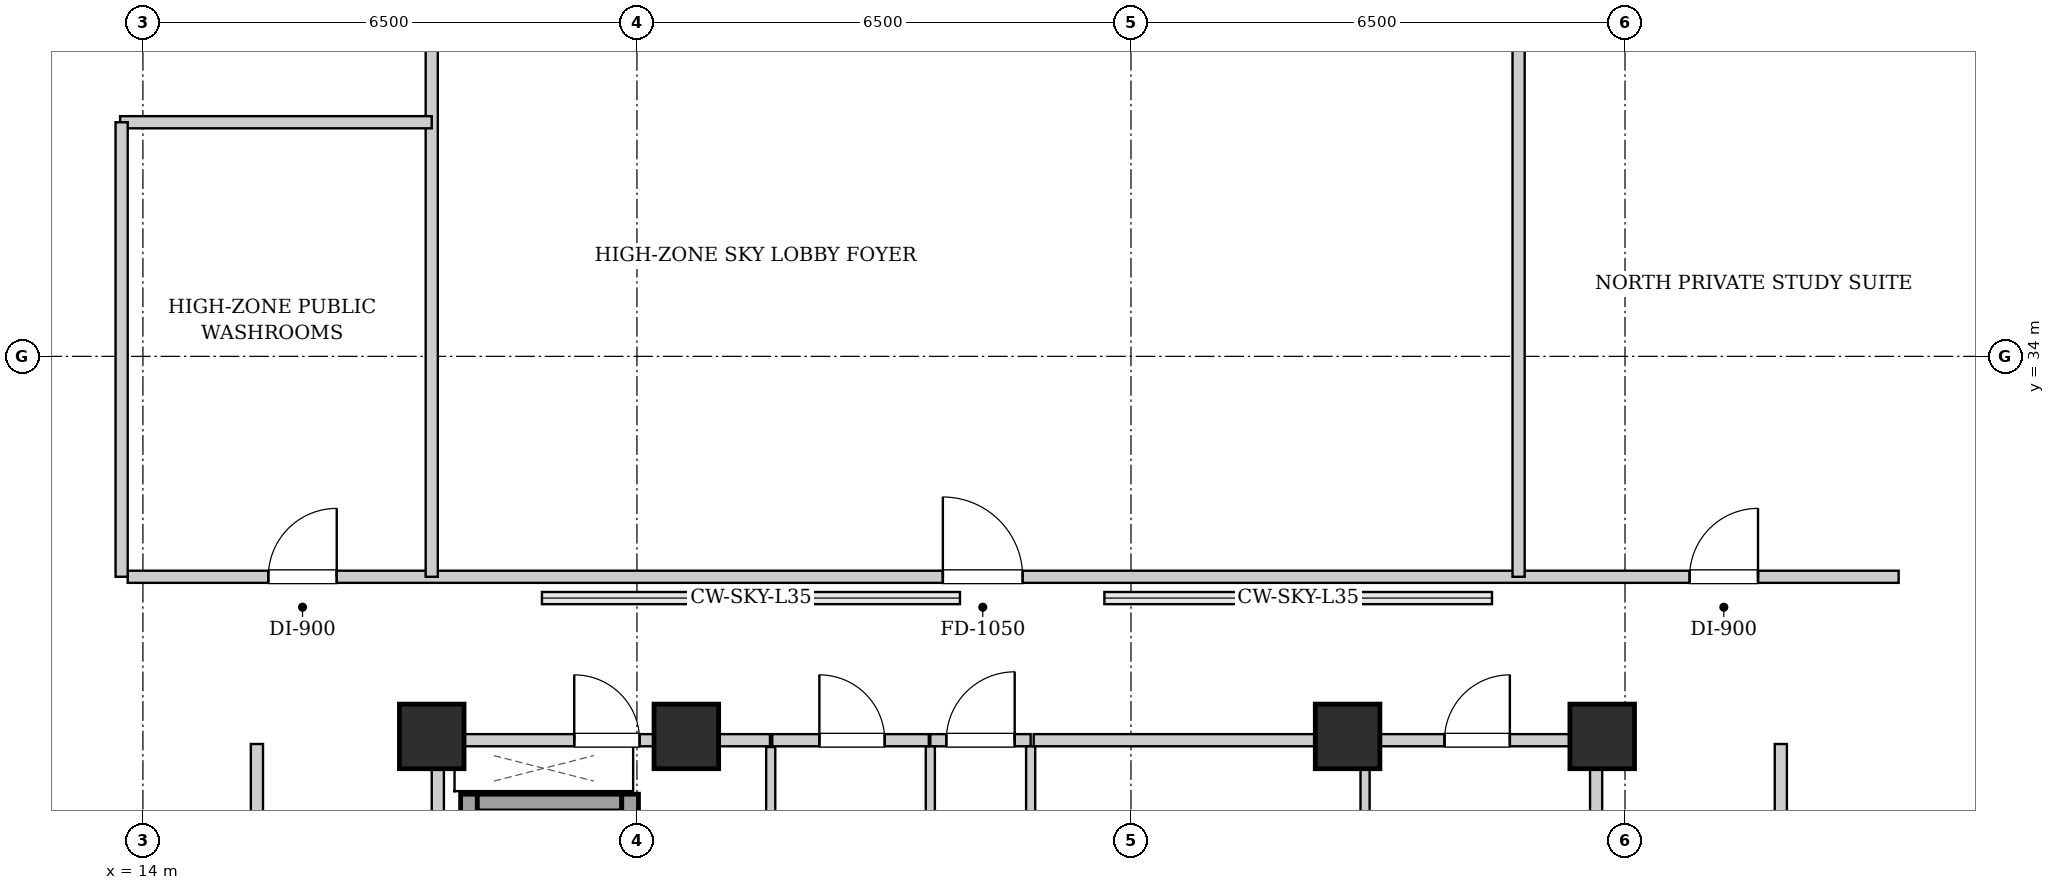
"""IFC4 building model, lengths in metres.
Left out: names, types, materials, properties, quantities, classifications, styles, units other than length and angle.
Written with IfcOpenShell. Run it as: python <this file> out.ifc"""

import sys

from ifc_helpers import new_model, si_unit, direction, frame, frame_2d, origin, origin_2d, place, context, subcontext, project, spatial, rectangle, extrude, element, fill, save


model = new_model("IFC4")
c1 = context("Model", 3, precision=1e-05, world=origin(), true_north=direction((0.0, 1.0)))
c2 = subcontext(c1, "Body", "Model", "MODEL_VIEW")
j1 = project(units=[si_unit("LENGTHUNIT", "METRE"), si_unit("PLANEANGLEUNIT", "RADIAN")], contexts=[c1])
p1 = place(None, origin())
s1 = spatial("IfcSite", under=j1, at=p1, CompositionType="ELEMENT")
p2 = place(p1, origin())
s2 = spatial("IfcBuilding", under=s1, at=p2, CompositionType="ELEMENT")
p3 = place(p2, frame((0.0, 0.0, 174.4)))
s3 = spatial("IfcBuildingStorey", under=s2, at=p3, CompositionType="ELEMENT", Elevation=174.4)
for number, where, z_axis, x_axis in (
    (1, (17.8, 29.0, 0.0), (0.0, 0.0, 1.0), (1.0, 0.0, 0.0)),
    (2, (21.15, 29.0, 0.0), (0.0, 0.0, 1.0), (1.0, 0.0, 0.0)),
    (3, (29.85, 29.0, 0.0), (0.0, 0.0, 1.0), (1.0, 0.0, 0.0)),
    (4, (33.2, 29.0, 0.0), (0.0, 0.0, 1.0), (1.0, 0.0, 0.0)),
):
    element("IfcColumn", number, at=place(p3, frame(where, z_axis=z_axis, x_axis=x_axis)), inside=s3, PredefinedType="COLUMN", context=c2, shape_type="SweptSolid", body=[
        extrude(rectangle(XDim=0.85, YDim=0.85, at=origin_2d()), origin(), (0.0, 0.0, 1.0), 3.3),
    ])
p4 = place(p3, frame((18.29, 24.1, 0.0), z_axis=(0.0, 0.0, 1.0), x_axis=(0.0, 1.0, 0.0)))
e5 = element("IfcWall", 5, at=p4, inside=s3, PredefinedType="SHEAR", context=c2, shape_type="SweptSolid", body=[
    extrude(rectangle(XDim=4.14, YDim=0.22, at=frame_2d((2.07, 0.0))), origin(), (0.0, 0.0, 1.0), 3.04),
])
p5 = place(p3, frame((18.4, 28.13, 0.0), z_axis=(0.0, 0.0, 1.0), x_axis=(1.0, 0.0, 0.0)))
e6 = element("IfcWall", 6, at=p5, inside=s3, PredefinedType="SHEAR", context=c2, shape_type="SweptSolid", body=[
    extrude(rectangle(XDim=1.9, YDim=0.22, at=frame_2d((0.95, 0.0))), origin(), (0.0, 0.0, 1.0), 3.04),
])
p6 = place(p3, frame((20.41, 26.06, 0.0), z_axis=(0.0, 0.0, 1.0), x_axis=(0.0, 1.0, 0.0)))
e7 = element("IfcWall", 7, at=p6, inside=s3, PredefinedType="SHEAR", context=c2, shape_type="SweptSolid", body=[
    extrude(rectangle(XDim=2.18, YDim=0.22, at=frame_2d((1.09, 0.0))), origin(), (0.0, 0.0, 1.0), 3.04),
])
p7 = place(p6, frame((0.54, 0.0, 0.0)))
e8 = element("IfcOpeningElement", 8, at=p7, cuts=e7, PredefinedType="OPENING", context=c2, shape_type="SweptSolid", body=[
    extrude(rectangle(XDim=1.1, YDim=2.15, at=frame_2d((0.55, 1.075))), frame((0.0, 0.12, 0.0), z_axis=(0.0, -1.0, 0.0), x_axis=(1.0, 0.0, 0.0)), (0.0, 0.0, 1.0), 0.24),
])
for number, where, z_axis, x_axis in (
    (9, (17.88, 24.12, 0.0), (0.0, 0.0, 1.0), (0.0, 1.0, 0.0)),
    (10, (33.12, 24.12, 0.0), (0.0, 0.0, 1.0), (0.0, 1.0, 0.0)),
):
    element("IfcWall", number, at=place(p3, frame(where, z_axis=z_axis, x_axis=x_axis)), inside=s3, PredefinedType="PARTITIONING", context=c2, shape_type="SweptSolid", body=[
        extrude(rectangle(XDim=4.76, YDim=0.16, at=frame_2d((2.38, 0.0))), origin(), (0.0, 0.0, 1.0), 3.04),
    ])
p8 = place(p3, frame((24.36, 28.95, 0.0), z_axis=(0.0, 0.0, 1.0), x_axis=(1.0, 0.0, 0.0)))
e11 = element("IfcWall", 11, at=p8, inside=s3, PredefinedType="PARTITIONING", context=c2, shape_type="SweptSolid", body=[
    extrude(rectangle(XDim=1.32, YDim=0.16, at=frame_2d((0.66, 0.0))), origin(), (0.0, 0.0, 1.0), 2.556),
])
p9 = place(p8, frame((0.21, 0.0, 0.0)))
e12 = element("IfcOpeningElement", 12, at=p9, cuts=e11, PredefinedType="OPENING", context=c2, shape_type="SweptSolid", body=[
    extrude(rectangle(XDim=0.9, YDim=2.05, at=frame_2d((0.45, 1.025))), frame((0.0, 0.09, 0.0), z_axis=(0.0, -1.0, 0.0), x_axis=(1.0, 0.0, 0.0)), (0.0, 0.0, 1.0), 0.18),
])
p10 = place(p3, frame((17.96, 28.95, 0.0), z_axis=(0.0, 0.0, 1.0), x_axis=(1.0, 0.0, 0.0)))
e13 = element("IfcWall", 13, at=p10, inside=s3, PredefinedType="PARTITIONING", context=c2, shape_type="SweptSolid", body=[
    extrude(rectangle(XDim=4.29, YDim=0.16, at=frame_2d((2.145, 0.0))), origin(), (0.0, 0.0, 1.0), 2.556),
])
p11 = place(p10, frame((1.715, 0.0, 0.0)))
e14 = element("IfcOpeningElement", 14, at=p11, cuts=e13, PredefinedType="OPENING", context=c2, shape_type="SweptSolid", body=[
    extrude(rectangle(XDim=0.86, YDim=2.05, at=frame_2d((0.43, 1.025))), frame((0.0, 0.09, 0.0), z_axis=(0.0, -1.0, 0.0), x_axis=(1.0, 0.0, 0.0)), (0.0, 0.0, 1.0), 0.18),
])
for number, where, z_axis, x_axis in (
    (15, (24.36, 25.0, 0.0), (0.0, 0.0, 1.0), (0.0, 1.0, 0.0)),
    (16, (25.68, 25.0, 0.0), (0.0, 0.0, 1.0), (0.0, 1.0, 0.0)),
):
    element("IfcWall", number, at=place(p3, frame(where, z_axis=z_axis, x_axis=x_axis)), inside=s3, PredefinedType="PARTITIONING", context=c2, shape_type="SweptSolid", body=[
        extrude(rectangle(XDim=3.87, YDim=0.12, at=frame_2d((1.935, 0.0))), origin(), (0.0, 0.0, 1.0), 3.04),
    ])
p12 = place(p3, frame((30.08, 26.18, 0.0), z_axis=(0.0, 0.0, 1.0), x_axis=(0.0, 1.0, 0.0)))
e17 = element("IfcWall", 17, at=p12, inside=s3, PredefinedType="PARTITIONING", context=c2, shape_type="SweptSolid", body=[
    extrude(rectangle(XDim=2.68, YDim=0.12, at=frame_2d((1.34, 0.0))), origin(), (0.0, 0.0, 1.0), 3.04),
])
p13 = place(p3, frame((30.08, 28.95, 0.0), z_axis=(0.0, 0.0, 1.0), x_axis=(1.0, 0.0, 0.0)))
e18 = element("IfcWall", 18, at=p13, inside=s3, PredefinedType="PARTITIONING", context=c2, shape_type="SweptSolid", body=[
    extrude(rectangle(XDim=2.96, YDim=0.16, at=frame_2d((1.48, 0.0))), origin(), (0.0, 0.0, 1.0), 3.04),
])
p14 = place(p13, frame((1.045, 0.0, 0.0)))
e19 = element("IfcOpeningElement", 19, at=p14, cuts=e18, PredefinedType="OPENING", context=c2, shape_type="SweptSolid", body=[
    extrude(rectangle(XDim=0.86, YDim=2.05, at=frame_2d((0.43, 1.025))), frame((0.0, 0.09, 0.0), z_axis=(0.0, -1.0, 0.0), x_axis=(1.0, 0.0, 0.0)), (0.0, 0.0, 1.0), 0.18),
])
p15 = place(p3, frame((22.26, 25.0, 0.0), z_axis=(0.0, 0.0, 1.0), x_axis=(0.0, 1.0, 0.0)))
e20 = element("IfcWall", 20, at=p15, inside=s3, PredefinedType="PARTITIONING", context=c2, shape_type="SweptSolid", body=[
    extrude(rectangle(XDim=3.86, YDim=0.12, at=frame_2d((1.93, 0.0))), origin(), (0.0, 0.0, 1.0), 3.04),
])
p16 = place(p3, frame((22.28, 28.95, 0.0), z_axis=(0.0, 0.0, 1.0), x_axis=(1.0, 0.0, 0.0)))
e21 = element("IfcWall", 21, at=p16, inside=s3, PredefinedType="PARTITIONING", context=c2, shape_type="SweptSolid", body=[
    extrude(rectangle(XDim=2.06, YDim=0.16, at=frame_2d((1.03, 0.0))), origin(), (0.0, 0.0, 1.0), 2.556),
])
p17 = place(p16, frame((0.62, 0.0, 0.0)))
e22 = element("IfcOpeningElement", 22, at=p17, cuts=e21, PredefinedType="OPENING", context=c2, shape_type="SweptSolid", body=[
    extrude(rectangle(XDim=0.86, YDim=2.05, at=frame_2d((0.43, 1.025))), frame((0.0, 0.09, 0.0), z_axis=(0.0, -1.0, 0.0), x_axis=(1.0, 0.0, 0.0)), (0.0, 0.0, 1.0), 0.18),
])
p18 = place(p3, frame((25.72, 28.95, 0.0), z_axis=(0.0, 0.0, 1.0), x_axis=(1.0, 0.0, 0.0)))
e23 = element("IfcWall", 23, at=p18, inside=s3, PredefinedType="PARTITIONING", context=c2, shape_type="SweptSolid", body=[
    extrude(rectangle(XDim=4.32, YDim=0.16, at=frame_2d((2.16, 0.0))), origin(), (0.0, 0.0, 1.0), 2.556),
])
p19 = place(p3, frame((13.8, 31.1, 0.0), z_axis=(0.0, 0.0, 1.0), x_axis=(1.0, 0.0, 0.0)))
e24 = element("IfcWall", 24, at=p19, inside=s3, PredefinedType="PARTITIONING", context=c2, shape_type="SweptSolid", body=[
    extrude(rectangle(XDim=23.3, YDim=0.16, at=frame_2d((11.65, 0.0))), origin(), (0.0, 0.0, 1.0), 3.04),
])
p20 = place(p19, frame((1.85, 0.0, 0.0)))
e25 = element("IfcOpeningElement", 25, at=p20, cuts=e24, PredefinedType="OPENING", context=c2, shape_type="SweptSolid", body=[
    extrude(rectangle(XDim=0.9, YDim=2.05, at=frame_2d((0.45, 1.025))), frame((0.0, 0.09, 0.0), z_axis=(0.0, -1.0, 0.0), x_axis=(1.0, 0.0, 0.0)), (0.0, 0.0, 1.0), 0.18),
])
p21 = place(p19, frame((10.725, 0.0, 0.0)))
e26 = element("IfcOpeningElement", 26, at=p21, cuts=e24, PredefinedType="OPENING", context=c2, shape_type="SweptSolid", body=[
    extrude(rectangle(XDim=1.05, YDim=2.05, at=frame_2d((0.525, 1.025))), frame((0.0, 0.09, 0.0), z_axis=(0.0, -1.0, 0.0), x_axis=(1.0, 0.0, 0.0)), (0.0, 0.0, 1.0), 0.18),
])
p22 = place(p19, frame((20.55, 0.0, 0.0)))
e27 = element("IfcOpeningElement", 27, at=p22, cuts=e24, PredefinedType="OPENING", context=c2, shape_type="SweptSolid", body=[
    extrude(rectangle(XDim=0.9, YDim=2.05, at=frame_2d((0.45, 1.025))), frame((0.0, 0.09, 0.0), z_axis=(0.0, -1.0, 0.0), x_axis=(1.0, 0.0, 0.0)), (0.0, 0.0, 1.0), 0.18),
])
p23 = place(p3, frame((17.8, 31.1, 0.0), z_axis=(0.0, 0.0, 1.0), x_axis=(0.0, 1.0, 0.0)))
e28 = element("IfcWall", 28, at=p23, inside=s3, PredefinedType="PARTITIONING", context=c2, shape_type="SweptSolid", body=[
    extrude(rectangle(XDim=8.8, YDim=0.16, at=frame_2d((4.4, 0.0))), origin(), (0.0, 0.0, 1.0), 2.556),
])
p24 = place(p3, frame((13.7, 37.08, 0.0), z_axis=(0.0, 0.0, 1.0), x_axis=(1.0, 0.0, 0.0)))
e29 = element("IfcWall", 29, at=p24, inside=s3, PredefinedType="PARTITIONING", context=c2, shape_type="SweptSolid", body=[
    extrude(rectangle(XDim=4.1, YDim=0.16, at=frame_2d((2.05, 0.0))), origin(), (0.0, 0.0, 1.0), 3.04),
])
p25 = place(p3, frame((13.72, 31.1, 0.0), z_axis=(0.0, 0.0, 1.0), x_axis=(0.0, 1.0, 0.0)))
e30 = element("IfcWall", 30, at=p25, inside=s3, PredefinedType="PARTITIONING", context=c2, shape_type="SweptSolid", body=[
    extrude(rectangle(XDim=5.98, YDim=0.16, at=frame_2d((2.99, 0.0))), origin(), (0.0, 0.0, 1.0), 3.04),
])
p26 = place(p3, frame((32.1, 31.1, 0.0), z_axis=(0.0, 0.0, 1.0), x_axis=(0.0, 1.0, 0.0)))
e31 = element("IfcWall", 31, at=p26, inside=s3, PredefinedType="PARTITIONING", context=c2, shape_type="SweptSolid", body=[
    extrude(rectangle(XDim=8.82, YDim=0.16, at=frame_2d((4.41, 0.0))), origin(), (0.0, 0.0, 1.0), 3.04),
])
p27 = place(p3, frame((15.5, 15.1, 0.0), z_axis=(0.0, 0.0, 1.0), x_axis=(0.0, 1.0, 0.0)))
e32 = element("IfcWall", 32, at=p27, inside=s3, PredefinedType="PARTITIONING", context=c2, shape_type="SweptSolid", body=[
    extrude(rectangle(XDim=13.8, YDim=0.16, at=frame_2d((6.9, 0.0))), origin(), (0.0, 0.0, 1.0), 3.04),
])
p28 = place(p27, frame((3.65, 0.0, 0.0)))
e33 = element("IfcOpeningElement", 33, at=p28, cuts=e32, PredefinedType="OPENING", context=c2, shape_type="SweptSolid", body=[
    extrude(rectangle(XDim=0.9, YDim=2.05, at=frame_2d((0.45, 1.025))), frame((0.0, 0.09, 0.0), z_axis=(0.0, -1.0, 0.0), x_axis=(1.0, 0.0, 0.0)), (0.0, 0.0, 1.0), 0.18),
])
p29 = place(p27, frame((10.05, 0.0, 0.0)))
e34 = element("IfcOpeningElement", 34, at=p29, cuts=e32, PredefinedType="OPENING", context=c2, shape_type="SweptSolid", body=[
    extrude(rectangle(XDim=0.9, YDim=2.05, at=frame_2d((0.45, 1.025))), frame((0.0, 0.09, 0.0), z_axis=(0.0, -1.0, 0.0), x_axis=(1.0, 0.0, 0.0)), (0.0, 0.0, 1.0), 0.18),
])
p30 = place(p3, frame((35.55, 15.1, 0.0), z_axis=(0.0, 0.0, 1.0), x_axis=(0.0, 1.0, 0.0)))
e35 = element("IfcWall", 35, at=p30, inside=s3, PredefinedType="PARTITIONING", context=c2, shape_type="SweptSolid", body=[
    extrude(rectangle(XDim=13.8, YDim=0.16, at=frame_2d((6.9, 0.0))), origin(), (0.0, 0.0, 1.0), 3.04),
])
p31 = place(p30, frame((6.475, 0.0, 0.0)))
e36 = element("IfcOpeningElement", 36, at=p31, cuts=e35, PredefinedType="OPENING", context=c2, shape_type="SweptSolid", body=[
    extrude(rectangle(XDim=1.05, YDim=2.05, at=frame_2d((0.525, 1.025))), frame((0.0, 0.09, 0.0), z_axis=(0.0, -1.0, 0.0), x_axis=(1.0, 0.0, 0.0)), (0.0, 0.0, 1.0), 0.18),
])
p32 = place(p9, origin())
e37 = element("IfcDoor", 37, at=p32, inside=s3, OperationType="SINGLE_SWING_RIGHT", PredefinedType="DOOR", context=c2, shape_type="SweptSolid", body=[
    extrude(rectangle(XDim=0.9, YDim=2.05, at=frame_2d((0.45, 1.025))), frame((0.0, 0.025, 0.0), z_axis=(0.0, -1.0, 0.0), x_axis=(1.0, 0.0, 0.0)), (0.0, 0.0, 1.0), 0.05),
])
fill(e12, e37)
p33 = place(p11, origin())
e38 = element("IfcDoor", 38, at=p33, inside=s3, OperationType="SINGLE_SWING_LEFT", PredefinedType="DOOR", context=c2, shape_type="SweptSolid", body=[
    extrude(rectangle(XDim=0.86, YDim=2.05, at=frame_2d((0.43, 1.025))), frame((0.0, 0.025, 0.0), z_axis=(0.0, -1.0, 0.0), x_axis=(1.0, 0.0, 0.0)), (0.0, 0.0, 1.0), 0.05),
])
fill(e14, e38)
p34 = place(p14, origin())
e39 = element("IfcDoor", 39, at=p34, inside=s3, OperationType="SINGLE_SWING_RIGHT", PredefinedType="DOOR", context=c2, shape_type="SweptSolid", body=[
    extrude(rectangle(XDim=0.86, YDim=2.05, at=frame_2d((0.43, 1.025))), frame((0.0, 0.025, 0.0), z_axis=(0.0, -1.0, 0.0), x_axis=(1.0, 0.0, 0.0)), (0.0, 0.0, 1.0), 0.05),
])
fill(e19, e39)
p35 = place(p17, origin())
e40 = element("IfcDoor", 40, at=p35, inside=s3, OperationType="SINGLE_SWING_LEFT", PredefinedType="DOOR", context=c2, shape_type="SweptSolid", body=[
    extrude(rectangle(XDim=0.86, YDim=2.05, at=frame_2d((0.43, 1.025))), frame((0.0, 0.025, 0.0), z_axis=(0.0, -1.0, 0.0), x_axis=(1.0, 0.0, 0.0)), (0.0, 0.0, 1.0), 0.05),
])
fill(e22, e40)
p36 = place(p20, origin())
e41 = element("IfcDoor", 41, at=p36, inside=s3, OperationType="SINGLE_SWING_RIGHT", PredefinedType="DOOR", context=c2, shape_type="SweptSolid", body=[
    extrude(rectangle(XDim=0.9, YDim=2.05, at=frame_2d((0.45, 1.025))), frame((0.0, 0.025, 0.0), z_axis=(0.0, -1.0, 0.0), x_axis=(1.0, 0.0, 0.0)), (0.0, 0.0, 1.0), 0.05),
])
fill(e25, e41)
p37 = place(p21, origin())
e42 = element("IfcDoor", 42, at=p37, inside=s3, OperationType="SINGLE_SWING_LEFT", PredefinedType="DOOR", context=c2, shape_type="SweptSolid", body=[
    extrude(rectangle(XDim=1.05, YDim=2.05, at=frame_2d((0.525, 1.025))), frame((0.0, 0.025, 0.0), z_axis=(0.0, -1.0, 0.0), x_axis=(1.0, 0.0, 0.0)), (0.0, 0.0, 1.0), 0.05),
])
fill(e26, e42)
p38 = place(p22, origin())
e43 = element("IfcDoor", 43, at=p38, inside=s3, OperationType="SINGLE_SWING_RIGHT", PredefinedType="DOOR", context=c2, shape_type="SweptSolid", body=[
    extrude(rectangle(XDim=0.9, YDim=2.05, at=frame_2d((0.45, 1.025))), frame((0.0, 0.025, 0.0), z_axis=(0.0, -1.0, 0.0), x_axis=(1.0, 0.0, 0.0)), (0.0, 0.0, 1.0), 0.05),
])
fill(e27, e43)
save(model, sys.argv[1])
